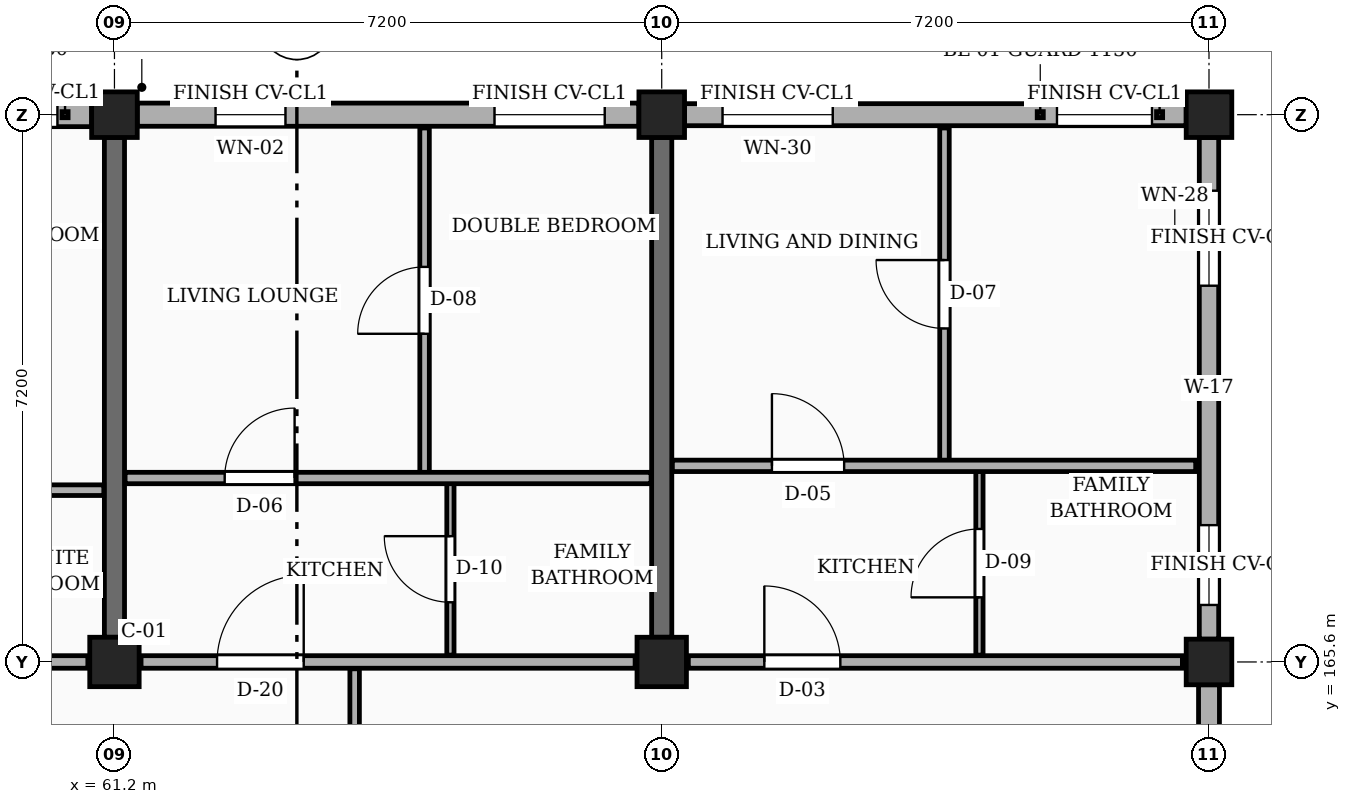
"""IFC4 building model, lengths in metres.
Left out: names, types, materials, properties, quantities, classifications, styles, units other than length and angle.
Written with IfcOpenShell. Run it as: python <this file> out.ifc"""

import sys

from ifc_helpers import new_model, si_unit, direction, frame, frame_2d, origin, origin_2d, place, context, subcontext, project, spatial, rectangle, extrude, element, fill, save


model = new_model("IFC4")
c1 = context("Model", 3, precision=1e-05, world=origin(), true_north=direction((0.0, 1.0)))
c2 = subcontext(c1, "Body", "Model", "MODEL_VIEW")
j1 = project(units=[si_unit("LENGTHUNIT", "METRE"), si_unit("PLANEANGLEUNIT", "RADIAN")], contexts=[c1])
p1 = place(None, origin())
s1 = spatial("IfcSite", under=j1, at=p1, CompositionType="ELEMENT")
p2 = place(p1, origin())
s2 = spatial("IfcBuilding", under=s1, at=p2, CompositionType="ELEMENT")
p3 = place(p2, frame((0.0, 0.0, 7.65)))
s3 = spatial("IfcBuildingStorey", under=s2, at=p3, CompositionType="ELEMENT", Elevation=7.65)
p4 = place(p3, frame((61.2, 165.6, 0.0), z_axis=(0.0, 0.0, 1.0), x_axis=(1.0, 0.0, 0.0)))
e1 = element("IfcColumn", 1, at=p4, inside=s3, PredefinedType="COLUMN", context=c2, shape_type="SweptSolid", body=[
    extrude(rectangle(XDim=0.65, YDim=0.65, at=origin_2d()), origin(), (0.0, 0.0, 1.0), 3.15),
])
p5 = place(p3, frame((61.2, 172.8, 0.0), z_axis=(0.0, 0.0, 1.0), x_axis=(1.0, 0.0, 0.0)))
e2 = element("IfcColumn", 2, at=p5, inside=s3, PredefinedType="COLUMN", context=c2, shape_type="SweptSolid", body=[
    extrude(rectangle(XDim=0.6, YDim=0.6, at=origin_2d()), origin(), (0.0, 0.0, 1.0), 3.15),
])
p6 = place(p3, frame((68.4, 165.6, 0.0), z_axis=(0.0, 0.0, 1.0), x_axis=(1.0, 0.0, 0.0)))
e3 = element("IfcColumn", 3, at=p6, inside=s3, PredefinedType="COLUMN", context=c2, shape_type="SweptSolid", body=[
    extrude(rectangle(XDim=0.65, YDim=0.65, at=origin_2d()), origin(), (0.0, 0.0, 1.0), 3.15),
])
for number, where, z_axis, x_axis in (
    (4, (68.4, 172.8, 0.0), (0.0, 0.0, 1.0), (1.0, 0.0, 0.0)),
    (5, (75.6, 165.6, 0.0), (0.0, 0.0, 1.0), (1.0, 0.0, 0.0)),
    (6, (75.6, 172.8, 0.0), (0.0, 0.0, 1.0), (1.0, 0.0, 0.0)),
):
    element("IfcColumn", number, at=place(p3, frame(where, z_axis=z_axis, x_axis=x_axis)), inside=s3, PredefinedType="COLUMN", context=c2, shape_type="SweptSolid", body=[
        extrude(rectangle(XDim=0.6, YDim=0.6, at=origin_2d()), origin(), (0.0, 0.0, 1.0), 3.15),
    ])
for number, where, z_axis, x_axis in (
    (7, (61.2, 165.925, 0.0), (0.0, 0.0, 1.0), (0.0, 1.0, 0.0)),
    (8, (68.4, 165.925, 0.0), (0.0, 0.0, 1.0), (0.0, 1.0, 0.0)),
):
    element("IfcWall", number, at=place(p3, frame(where, z_axis=z_axis, x_axis=x_axis)), inside=s3, PredefinedType="SOLIDWALL", context=c2, shape_type="SweptSolid", body=[
        extrude(rectangle(XDim=6.575, YDim=0.265, at=frame_2d((3.288, 0.0))), origin(), (0.0, 0.0, 1.0), 2.185),
    ])
p7 = place(p3, frame((75.6, 158.7, 0.0), z_axis=(0.0, 0.0, 1.0), x_axis=(0.0, 1.0, 0.0)))
e9 = element("IfcWall", 9, at=p7, inside=s3, PredefinedType="SOLIDWALL", context=c2, shape_type="SweptSolid", body=[
    extrude(rectangle(XDim=6.6, YDim=0.275, at=frame_2d((3.3, 0.0))), origin(), (0.0, 0.0, 1.0), 2.455),
])
p8 = place(p7, frame((0.45, 0.0, 0.78)))
e10 = element("IfcOpeningElement", 10, at=p8, cuts=e9, PredefinedType="OPENING", context=c2, shape_type="SweptSolid", body=[
    extrude(rectangle(XDim=1.46, YDim=1.36, at=frame_2d((0.73, 0.68))), frame((0.0, 0.147, 0.0), z_axis=(0.0, -1.0, 0.0), x_axis=(1.0, 0.0, 0.0)), (0.0, 0.0, 1.0), 0.295),
])
p9 = place(p7, frame((4.65, 0.0, 0.78)))
e11 = element("IfcOpeningElement", 11, at=p9, cuts=e9, PredefinedType="OPENING", context=c2, shape_type="SweptSolid", body=[
    extrude(rectangle(XDim=1.05, YDim=1.44, at=frame_2d((0.525, 0.72))), frame((0.0, 0.147, 0.0), z_axis=(0.0, -1.0, 0.0), x_axis=(1.0, 0.0, 0.0)), (0.0, 0.0, 1.0), 0.295),
])
p10 = place(p3, frame((75.6, 165.9, 0.0), z_axis=(0.0, 0.0, 1.0), x_axis=(0.0, 1.0, 0.0)))
e12 = element("IfcWall", 12, at=p10, inside=s3, PredefinedType="SOLIDWALL", context=c2, shape_type="SweptSolid", body=[
    extrude(rectangle(XDim=6.6, YDim=0.255, at=frame_2d((3.3, 0.0))), origin(), (0.0, 0.0, 1.0), 2.455),
])
p11 = place(p10, frame((0.45, 0.0, 0.78)))
e13 = element("IfcOpeningElement", 13, at=p11, cuts=e12, PredefinedType="OPENING", context=c2, shape_type="SweptSolid", body=[
    extrude(rectangle(XDim=1.05, YDim=1.44, at=frame_2d((0.525, 0.72))), frame((0.0, 0.137, 0.0), z_axis=(0.0, -1.0, 0.0), x_axis=(1.0, 0.0, 0.0)), (0.0, 0.0, 1.0), 0.275),
])
p12 = place(p10, frame((4.65, 0.0, 0.78)))
e14 = element("IfcOpeningElement", 14, at=p12, cuts=e12, PredefinedType="OPENING", context=c2, shape_type="SweptSolid", body=[
    extrude(rectangle(XDim=1.25, YDim=1.44, at=frame_2d((0.625, 0.72))), frame((0.0, 0.137, 0.0), z_axis=(0.0, -1.0, 0.0), x_axis=(1.0, 0.0, 0.0)), (0.0, 0.0, 1.0), 0.275),
])
p13 = place(p3, frame((75.3, 172.8, 0.0), z_axis=(0.0, 0.0, 1.0), x_axis=(-1.0, 0.0, 0.0)))
e15 = element("IfcWall", 15, at=p13, inside=s3, PredefinedType="SOLIDWALL", context=c2, shape_type="SweptSolid", body=[
    extrude(rectangle(XDim=6.6, YDim=0.29, at=frame_2d((3.3, 0.0))), origin(), (0.0, 0.0, 1.0), 2.455),
])
p14 = place(p13, frame((0.45, 0.0, 0.78)))
e16 = element("IfcOpeningElement", 16, at=p14, cuts=e15, PredefinedType="OPENING", context=c2, shape_type="SweptSolid", body=[
    extrude(rectangle(XDim=1.25, YDim=1.44, at=frame_2d((0.625, 0.72))), frame((0.0, 0.155, 0.0), z_axis=(0.0, -1.0, 0.0), x_axis=(1.0, 0.0, 0.0)), (0.0, 0.0, 1.0), 0.31),
])
p15 = place(p13, frame((4.65, 0.0, 0.78)))
e17 = element("IfcOpeningElement", 17, at=p15, cuts=e15, PredefinedType="OPENING", context=c2, shape_type="SweptSolid", body=[
    extrude(rectangle(XDim=1.45, YDim=1.44, at=frame_2d((0.725, 0.72))), frame((0.0, 0.155, 0.0), z_axis=(0.0, -1.0, 0.0), x_axis=(1.0, 0.0, 0.0)), (0.0, 0.0, 1.0), 0.31),
])
p16 = place(p3, frame((68.1, 172.8, 0.0), z_axis=(0.0, 0.0, 1.0), x_axis=(-1.0, 0.0, 0.0)))
e18 = element("IfcWall", 18, at=p16, inside=s3, PredefinedType="SOLIDWALL", context=c2, shape_type="SweptSolid", body=[
    extrude(rectangle(XDim=6.6, YDim=0.305, at=frame_2d((3.3, 0.0))), origin(), (0.0, 0.0, 1.0), 2.455),
])
p17 = place(p16, frame((0.45, 0.0, 0.78)))
e19 = element("IfcOpeningElement", 19, at=p17, cuts=e18, PredefinedType="OPENING", context=c2, shape_type="SweptSolid", body=[
    extrude(rectangle(XDim=1.45, YDim=1.44, at=frame_2d((0.725, 0.72))), frame((0.0, 0.163, 0.0), z_axis=(0.0, -1.0, 0.0), x_axis=(1.0, 0.0, 0.0)), (0.0, 0.0, 1.0), 0.325),
])
p18 = place(p16, frame((4.65, 0.0, 0.78)))
e20 = element("IfcOpeningElement", 20, at=p18, cuts=e18, PredefinedType="OPENING", context=c2, shape_type="SweptSolid", body=[
    extrude(rectangle(XDim=0.92, YDim=1.15, at=frame_2d((0.46, 0.575))), frame((0.0, 0.163, 0.0), z_axis=(0.0, -1.0, 0.0), x_axis=(1.0, 0.0, 0.0)), (0.0, 0.0, 1.0), 0.325),
])
p19 = place(p3, frame((60.9, 172.8, 0.0), z_axis=(0.0, 0.0, 1.0), x_axis=(-1.0, 0.0, 0.0)))
e21 = element("IfcWall", 21, at=p19, inside=s3, PredefinedType="SOLIDWALL", context=c2, shape_type="SweptSolid", body=[
    extrude(rectangle(XDim=6.6, YDim=0.315, at=frame_2d((3.3, 0.0))), origin(), (0.0, 0.0, 1.0), 2.455),
])
p20 = place(p19, frame((0.45, 0.0, 0.78)))
e22 = element("IfcOpeningElement", 22, at=p20, cuts=e21, PredefinedType="OPENING", context=c2, shape_type="SweptSolid", body=[
    extrude(rectangle(XDim=0.92, YDim=1.15, at=frame_2d((0.46, 0.575))), frame((0.0, 0.167, 0.0), z_axis=(0.0, -1.0, 0.0), x_axis=(1.0, 0.0, 0.0)), (0.0, 0.0, 1.0), 0.335),
])
p21 = place(p19, frame((4.65, 0.0, 0.78)))
e23 = element("IfcOpeningElement", 23, at=p21, cuts=e21, PredefinedType="OPENING", context=c2, shape_type="SweptSolid", body=[
    extrude(rectangle(XDim=1.08, YDim=1.15, at=frame_2d((0.54, 0.575))), frame((0.0, 0.167, 0.0), z_axis=(0.0, -1.0, 0.0), x_axis=(1.0, 0.0, 0.0)), (0.0, 0.0, 1.0), 0.335),
])
p22 = place(p3, frame((54.35, 165.6, 0.0), z_axis=(0.0, 0.0, 1.0), x_axis=(1.0, 0.0, 0.0)))
e24 = element("IfcWall", 24, at=p22, inside=s3, PredefinedType="PARTITIONING", context=c2, shape_type="SweptSolid", body=[
    extrude(rectangle(XDim=6.5, YDim=0.165, at=frame_2d((3.25, 0.0))), origin(), (0.0, 0.0, 1.0), 2.185),
])
p23 = place(p22, frame((1.0, 0.0, 0.0)))
e25 = element("IfcOpeningElement", 25, at=p23, cuts=e24, PredefinedType="OPENING", context=c2, shape_type="SweptSolid", body=[
    extrude(rectangle(XDim=0.94, YDim=2.12, at=frame_2d((0.47, 1.06))), frame((0.0, 0.093, 0.0), z_axis=(0.0, -1.0, 0.0), x_axis=(1.0, 0.0, 0.0)), (0.0, 0.0, 1.0), 0.185),
])
p24 = place(p3, frame((61.55, 165.6, 0.0), z_axis=(0.0, 0.0, 1.0), x_axis=(1.0, 0.0, 0.0)))
e26 = element("IfcWall", 26, at=p24, inside=s3, PredefinedType="PARTITIONING", context=c2, shape_type="SweptSolid", body=[
    extrude(rectangle(XDim=6.5, YDim=0.165, at=frame_2d((3.25, 0.0))), origin(), (0.0, 0.0, 1.0), 2.185),
])
p25 = place(p24, frame((1.0, 0.0, 0.0)))
e27 = element("IfcOpeningElement", 27, at=p25, cuts=e26, PredefinedType="OPENING", context=c2, shape_type="SweptSolid", body=[
    extrude(rectangle(XDim=1.14, YDim=2.18, at=frame_2d((0.57, 1.09))), frame((0.0, 0.093, 0.0), z_axis=(0.0, -1.0, 0.0), x_axis=(1.0, 0.0, 0.0)), (0.0, 0.0, 1.0), 0.185),
])
p26 = place(p3, frame((68.75, 165.6, 0.0), z_axis=(0.0, 0.0, 1.0), x_axis=(1.0, 0.0, 0.0)))
e28 = element("IfcWall", 28, at=p26, inside=s3, PredefinedType="PARTITIONING", context=c2, shape_type="SweptSolid", body=[
    extrude(rectangle(XDim=6.5, YDim=0.165, at=frame_2d((3.25, 0.0))), origin(), (0.0, 0.0, 1.0), 2.185),
])
p27 = place(p26, frame((1.0, 0.0, 0.0)))
e29 = element("IfcOpeningElement", 29, at=p27, cuts=e28, PredefinedType="OPENING", context=c2, shape_type="SweptSolid", body=[
    extrude(rectangle(XDim=1.0, YDim=2.15, at=frame_2d((0.5, 1.075))), frame((0.0, 0.093, 0.0), z_axis=(0.0, -1.0, 0.0), x_axis=(1.0, 0.0, 0.0)), (0.0, 0.0, 1.0), 0.185),
])
p28 = place(p3, frame((54.14, 167.86, 0.0), z_axis=(0.0, 0.0, 1.0), x_axis=(1.0, 0.0, 0.0)))
e30 = element("IfcWall", 30, at=p28, inside=s3, PredefinedType="PARTITIONING", context=c2, shape_type="SweptSolid", body=[
    extrude(rectangle(XDim=6.92, YDim=0.14, at=frame_2d((3.46, 0.0))), origin(), (0.0, 0.0, 1.0), 2.32),
])
p29 = place(p28, frame((1.31, 0.0, 0.0)))
e31 = element("IfcOpeningElement", 31, at=p29, cuts=e30, PredefinedType="OPENING", context=c2, shape_type="SweptSolid", body=[
    extrude(rectangle(XDim=0.95, YDim=2.1, at=frame_2d((0.475, 1.05))), frame((0.0, 0.08, 0.0), z_axis=(0.0, -1.0, 0.0), x_axis=(1.0, 0.0, 0.0)), (0.0, 0.0, 1.0), 0.16),
])
p30 = place(p3, frame((64.36, 158.49, 0.0), z_axis=(0.0, 0.0, 1.0), x_axis=(0.0, 1.0, 0.0)))
e32 = element("IfcWall", 32, at=p30, inside=s3, PredefinedType="PARTITIONING", context=c2, shape_type="SweptSolid", body=[
    extrude(rectangle(XDim=7.02, YDim=0.125, at=frame_2d((3.51, 0.0))), origin(), (0.0, 0.0, 1.0), 2.32),
])
p31 = place(p30, frame((2.85, 0.0, 0.0)))
e33 = element("IfcOpeningElement", 33, at=p31, cuts=e32, PredefinedType="OPENING", context=c2, shape_type="SweptSolid", body=[
    extrude(rectangle(XDim=1.02, YDim=2.15, at=frame_2d((0.51, 1.075))), frame((0.0, 0.073, 0.0), z_axis=(0.0, -1.0, 0.0), x_axis=(1.0, 0.0, 0.0)), (0.0, 0.0, 1.0), 0.145),
])
p32 = place(p3, frame((65.28, 168.09, 0.0), z_axis=(0.0, 0.0, 1.0), x_axis=(0.0, 1.0, 0.0)))
e34 = element("IfcWall", 34, at=p32, inside=s3, PredefinedType="PARTITIONING", context=c2, shape_type="SweptSolid", body=[
    extrude(rectangle(XDim=4.535, YDim=0.125, at=frame_2d((2.268, 0.0))), origin(), (0.0, 0.0, 1.0), 2.32),
])
p33 = place(p32, frame((1.827, 0.0, 0.0)))
e35 = element("IfcOpeningElement", 35, at=p33, cuts=e34, PredefinedType="OPENING", context=c2, shape_type="SweptSolid", body=[
    extrude(rectangle(XDim=0.88, YDim=2.08, at=frame_2d((0.44, 1.04))), frame((0.0, 0.073, 0.0), z_axis=(0.0, -1.0, 0.0), x_axis=(1.0, 0.0, 0.0)), (0.0, 0.0, 1.0), 0.145),
])
p34 = place(p3, frame((65.62, 165.69, 0.0), z_axis=(0.0, 0.0, 1.0), x_axis=(0.0, 1.0, 0.0)))
e36 = element("IfcWall", 36, at=p34, inside=s3, PredefinedType="PARTITIONING", context=c2, shape_type="SweptSolid", body=[
    extrude(rectangle(XDim=2.26, YDim=0.095, at=frame_2d((1.13, 0.0))), origin(), (0.0, 0.0, 1.0), 2.32),
])
p35 = place(p34, frame((0.695, 0.0, 0.0)))
e37 = element("IfcOpeningElement", 37, at=p35, cuts=e36, PredefinedType="OPENING", context=c2, shape_type="SweptSolid", body=[
    extrude(rectangle(XDim=0.87, YDim=2.05, at=frame_2d((0.435, 1.025))), frame((0.0, 0.058, 0.0), z_axis=(0.0, -1.0, 0.0), x_axis=(1.0, 0.0, 0.0)), (0.0, 0.0, 1.0), 0.115),
])
p36 = place(p3, frame((61.34, 168.02, 0.0), z_axis=(0.0, 0.0, 1.0), x_axis=(1.0, 0.0, 0.0)))
e38 = element("IfcWall", 38, at=p36, inside=s3, PredefinedType="PARTITIONING", context=c2, shape_type="SweptSolid", body=[
    extrude(rectangle(XDim=6.92, YDim=0.15, at=frame_2d((3.46, 0.0))), origin(), (0.0, 0.0, 1.0), 2.32),
])
p37 = place(p36, frame((1.31, 0.0, 0.0)))
e39 = element("IfcOpeningElement", 39, at=p37, cuts=e38, PredefinedType="OPENING", context=c2, shape_type="SweptSolid", body=[
    extrude(rectangle(XDim=0.92, YDim=2.1, at=frame_2d((0.46, 1.05))), frame((0.0, 0.085, 0.0), z_axis=(0.0, -1.0, 0.0), x_axis=(1.0, 0.0, 0.0)), (0.0, 0.0, 1.0), 0.17),
])
p38 = place(p3, frame((72.12, 168.25, 0.0), z_axis=(0.0, 0.0, 1.0), x_axis=(0.0, 1.0, 0.0)))
e40 = element("IfcWall", 40, at=p38, inside=s3, PredefinedType="PARTITIONING", context=c2, shape_type="SweptSolid", body=[
    extrude(rectangle(XDim=4.375, YDim=0.125, at=frame_2d((2.188, 0.0))), origin(), (0.0, 0.0, 1.0), 2.32),
])
p39 = place(p38, frame((1.738, 0.0, 0.0)))
e41 = element("IfcOpeningElement", 41, at=p39, cuts=e40, PredefinedType="OPENING", context=c2, shape_type="SweptSolid", body=[
    extrude(rectangle(XDim=0.9, YDim=2.1, at=frame_2d((0.45, 1.05))), frame((0.0, 0.073, 0.0), z_axis=(0.0, -1.0, 0.0), x_axis=(1.0, 0.0, 0.0)), (0.0, 0.0, 1.0), 0.145),
])
p40 = place(p3, frame((72.58, 165.69, 0.0), z_axis=(0.0, 0.0, 1.0), x_axis=(0.0, 1.0, 0.0)))
e42 = element("IfcWall", 42, at=p40, inside=s3, PredefinedType="PARTITIONING", context=c2, shape_type="SweptSolid", body=[
    extrude(rectangle(XDim=2.42, YDim=0.095, at=frame_2d((1.21, 0.0))), origin(), (0.0, 0.0, 1.0), 2.32),
])
p41 = place(p40, frame((0.76, 0.0, 0.0)))
e43 = element("IfcOpeningElement", 43, at=p41, cuts=e42, PredefinedType="OPENING", context=c2, shape_type="SweptSolid", body=[
    extrude(rectangle(XDim=0.9, YDim=2.05, at=frame_2d((0.45, 1.025))), frame((0.0, 0.058, 0.0), z_axis=(0.0, -1.0, 0.0), x_axis=(1.0, 0.0, 0.0)), (0.0, 0.0, 1.0), 0.115),
])
p42 = place(p3, frame((68.54, 168.18, 0.0), z_axis=(0.0, 0.0, 1.0), x_axis=(1.0, 0.0, 0.0)))
e44 = element("IfcWall", 44, at=p42, inside=s3, PredefinedType="PARTITIONING", context=c2, shape_type="SweptSolid", body=[
    extrude(rectangle(XDim=6.885, YDim=0.15, at=frame_2d((3.442, 0.0))), origin(), (0.0, 0.0, 1.0), 2.32),
])
p43 = place(p42, frame((1.31, 0.0, 0.0)))
e45 = element("IfcOpeningElement", 45, at=p43, cuts=e44, PredefinedType="OPENING", context=c2, shape_type="SweptSolid", body=[
    extrude(rectangle(XDim=0.95, YDim=2.1, at=frame_2d((0.475, 1.05))), frame((0.0, 0.085, 0.0), z_axis=(0.0, -1.0, 0.0), x_axis=(1.0, 0.0, 0.0)), (0.0, 0.0, 1.0), 0.17),
])
p44 = place(p11, origin())
e46 = element("IfcWindow", 46, at=p44, inside=s3, PartitioningType="SINGLE_PANEL", PredefinedType="WINDOW", context=c2, shape_type="SweptSolid", body=[
    extrude(rectangle(XDim=1.05, YDim=1.44, at=frame_2d((0.525, 0.72))), frame((0.0, 0.03, 0.0), z_axis=(0.0, -1.0, 0.0), x_axis=(1.0, 0.0, 0.0)), (0.0, 0.0, 1.0), 0.06),
])
fill(e13, e46)
p45 = place(p12, origin())
e47 = element("IfcWindow", 47, at=p45, inside=s3, PartitioningType="SINGLE_PANEL", PredefinedType="WINDOW", context=c2, shape_type="SweptSolid", body=[
    extrude(rectangle(XDim=1.25, YDim=1.44, at=frame_2d((0.625, 0.72))), frame((0.0, 0.03, 0.0), z_axis=(0.0, -1.0, 0.0), x_axis=(1.0, 0.0, 0.0)), (0.0, 0.0, 1.0), 0.06),
])
fill(e14, e47)
p46 = place(p14, origin())
e48 = element("IfcWindow", 48, at=p46, inside=s3, PartitioningType="SINGLE_PANEL", PredefinedType="WINDOW", context=c2, shape_type="SweptSolid", body=[
    extrude(rectangle(XDim=1.25, YDim=1.44, at=frame_2d((0.625, 0.72))), frame((0.0, 0.03, 0.0), z_axis=(0.0, -1.0, 0.0), x_axis=(1.0, 0.0, 0.0)), (0.0, 0.0, 1.0), 0.06),
])
fill(e16, e48)
p47 = place(p15, origin())
e49 = element("IfcWindow", 49, at=p47, inside=s3, PartitioningType="SINGLE_PANEL", PredefinedType="WINDOW", context=c2, shape_type="SweptSolid", body=[
    extrude(rectangle(XDim=1.45, YDim=1.44, at=frame_2d((0.725, 0.72))), frame((0.0, 0.03, 0.0), z_axis=(0.0, -1.0, 0.0), x_axis=(1.0, 0.0, 0.0)), (0.0, 0.0, 1.0), 0.06),
])
fill(e17, e49)
p48 = place(p17, origin())
e50 = element("IfcWindow", 50, at=p48, inside=s3, PartitioningType="SINGLE_PANEL", PredefinedType="WINDOW", context=c2, shape_type="SweptSolid", body=[
    extrude(rectangle(XDim=1.45, YDim=1.44, at=frame_2d((0.725, 0.72))), frame((0.0, 0.03, 0.0), z_axis=(0.0, -1.0, 0.0), x_axis=(1.0, 0.0, 0.0)), (0.0, 0.0, 1.0), 0.06),
])
fill(e19, e50)
p49 = place(p18, origin())
e51 = element("IfcWindow", 51, at=p49, inside=s3, PartitioningType="SINGLE_PANEL", PredefinedType="WINDOW", context=c2, shape_type="SweptSolid", body=[
    extrude(rectangle(XDim=0.92, YDim=1.15, at=frame_2d((0.46, 0.575))), frame((0.0, 0.03, 0.0), z_axis=(0.0, -1.0, 0.0), x_axis=(1.0, 0.0, 0.0)), (0.0, 0.0, 1.0), 0.06),
])
fill(e20, e51)
p50 = place(p20, origin())
e52 = element("IfcWindow", 52, at=p50, inside=s3, PartitioningType="SINGLE_PANEL", PredefinedType="WINDOW", context=c2, shape_type="SweptSolid", body=[
    extrude(rectangle(XDim=0.92, YDim=1.15, at=frame_2d((0.46, 0.575))), frame((0.0, 0.03, 0.0), z_axis=(0.0, -1.0, 0.0), x_axis=(1.0, 0.0, 0.0)), (0.0, 0.0, 1.0), 0.06),
])
fill(e22, e52)
p51 = place(p25, origin())
e53 = element("IfcDoor", 53, at=p51, inside=s3, OperationType="SINGLE_SWING_RIGHT", PredefinedType="DOOR", context=c2, shape_type="SweptSolid", body=[
    extrude(rectangle(XDim=1.14, YDim=2.18, at=frame_2d((0.57, 1.09))), frame((0.0, 0.025, 0.0), z_axis=(0.0, -1.0, 0.0), x_axis=(1.0, 0.0, 0.0)), (0.0, 0.0, 1.0), 0.05),
])
fill(e27, e53)
p52 = place(p27, origin())
e54 = element("IfcDoor", 54, at=p52, inside=s3, OperationType="SINGLE_SWING_LEFT", PredefinedType="DOOR", context=c2, shape_type="SweptSolid", body=[
    extrude(rectangle(XDim=1.0, YDim=2.15, at=frame_2d((0.5, 1.075))), frame((0.0, 0.025, 0.0), z_axis=(0.0, -1.0, 0.0), x_axis=(1.0, 0.0, 0.0)), (0.0, 0.0, 1.0), 0.05),
])
fill(e29, e54)
p53 = place(p33, origin())
e55 = element("IfcDoor", 55, at=p53, inside=s3, OperationType="SINGLE_SWING_LEFT", PredefinedType="DOOR", context=c2, shape_type="SweptSolid", body=[
    extrude(rectangle(XDim=0.88, YDim=2.08, at=frame_2d((0.44, 1.04))), frame((0.0, 0.025, 0.0), z_axis=(0.0, -1.0, 0.0), x_axis=(1.0, 0.0, 0.0)), (0.0, 0.0, 1.0), 0.05),
])
fill(e35, e55)
p54 = place(p35, origin())
e56 = element("IfcDoor", 56, at=p54, inside=s3, OperationType="SINGLE_SWING_RIGHT", PredefinedType="DOOR", context=c2, shape_type="SweptSolid", body=[
    extrude(rectangle(XDim=0.87, YDim=2.05, at=frame_2d((0.435, 1.025))), frame((0.0, 0.025, 0.0), z_axis=(0.0, -1.0, 0.0), x_axis=(1.0, 0.0, 0.0)), (0.0, 0.0, 1.0), 0.05),
])
fill(e37, e56)
p55 = place(p37, origin())
e57 = element("IfcDoor", 57, at=p55, inside=s3, OperationType="SINGLE_SWING_RIGHT", PredefinedType="DOOR", context=c2, shape_type="SweptSolid", body=[
    extrude(rectangle(XDim=0.92, YDim=2.1, at=frame_2d((0.46, 1.05))), frame((0.0, 0.025, 0.0), z_axis=(0.0, -1.0, 0.0), x_axis=(1.0, 0.0, 0.0)), (0.0, 0.0, 1.0), 0.05),
])
fill(e39, e57)
p56 = place(p39, origin())
e58 = element("IfcDoor", 58, at=p56, inside=s3, OperationType="SINGLE_SWING_RIGHT", PredefinedType="DOOR", context=c2, shape_type="SweptSolid", body=[
    extrude(rectangle(XDim=0.9, YDim=2.1, at=frame_2d((0.45, 1.05))), frame((0.0, 0.025, 0.0), z_axis=(0.0, -1.0, 0.0), x_axis=(1.0, 0.0, 0.0)), (0.0, 0.0, 1.0), 0.05),
])
fill(e41, e58)
p57 = place(p41, origin())
e59 = element("IfcDoor", 59, at=p57, inside=s3, OperationType="SINGLE_SWING_LEFT", PredefinedType="DOOR", context=c2, shape_type="SweptSolid", body=[
    extrude(rectangle(XDim=0.9, YDim=2.05, at=frame_2d((0.45, 1.025))), frame((0.0, 0.025, 0.0), z_axis=(0.0, -1.0, 0.0), x_axis=(1.0, 0.0, 0.0)), (0.0, 0.0, 1.0), 0.05),
])
fill(e43, e59)
p58 = place(p43, origin())
e60 = element("IfcDoor", 60, at=p58, inside=s3, OperationType="SINGLE_SWING_LEFT", PredefinedType="DOOR", context=c2, shape_type="SweptSolid", body=[
    extrude(rectangle(XDim=0.95, YDim=2.1, at=frame_2d((0.475, 1.05))), frame((0.0, 0.025, 0.0), z_axis=(0.0, -1.0, 0.0), x_axis=(1.0, 0.0, 0.0)), (0.0, 0.0, 1.0), 0.05),
])
fill(e45, e60)
save(model, sys.argv[1])
